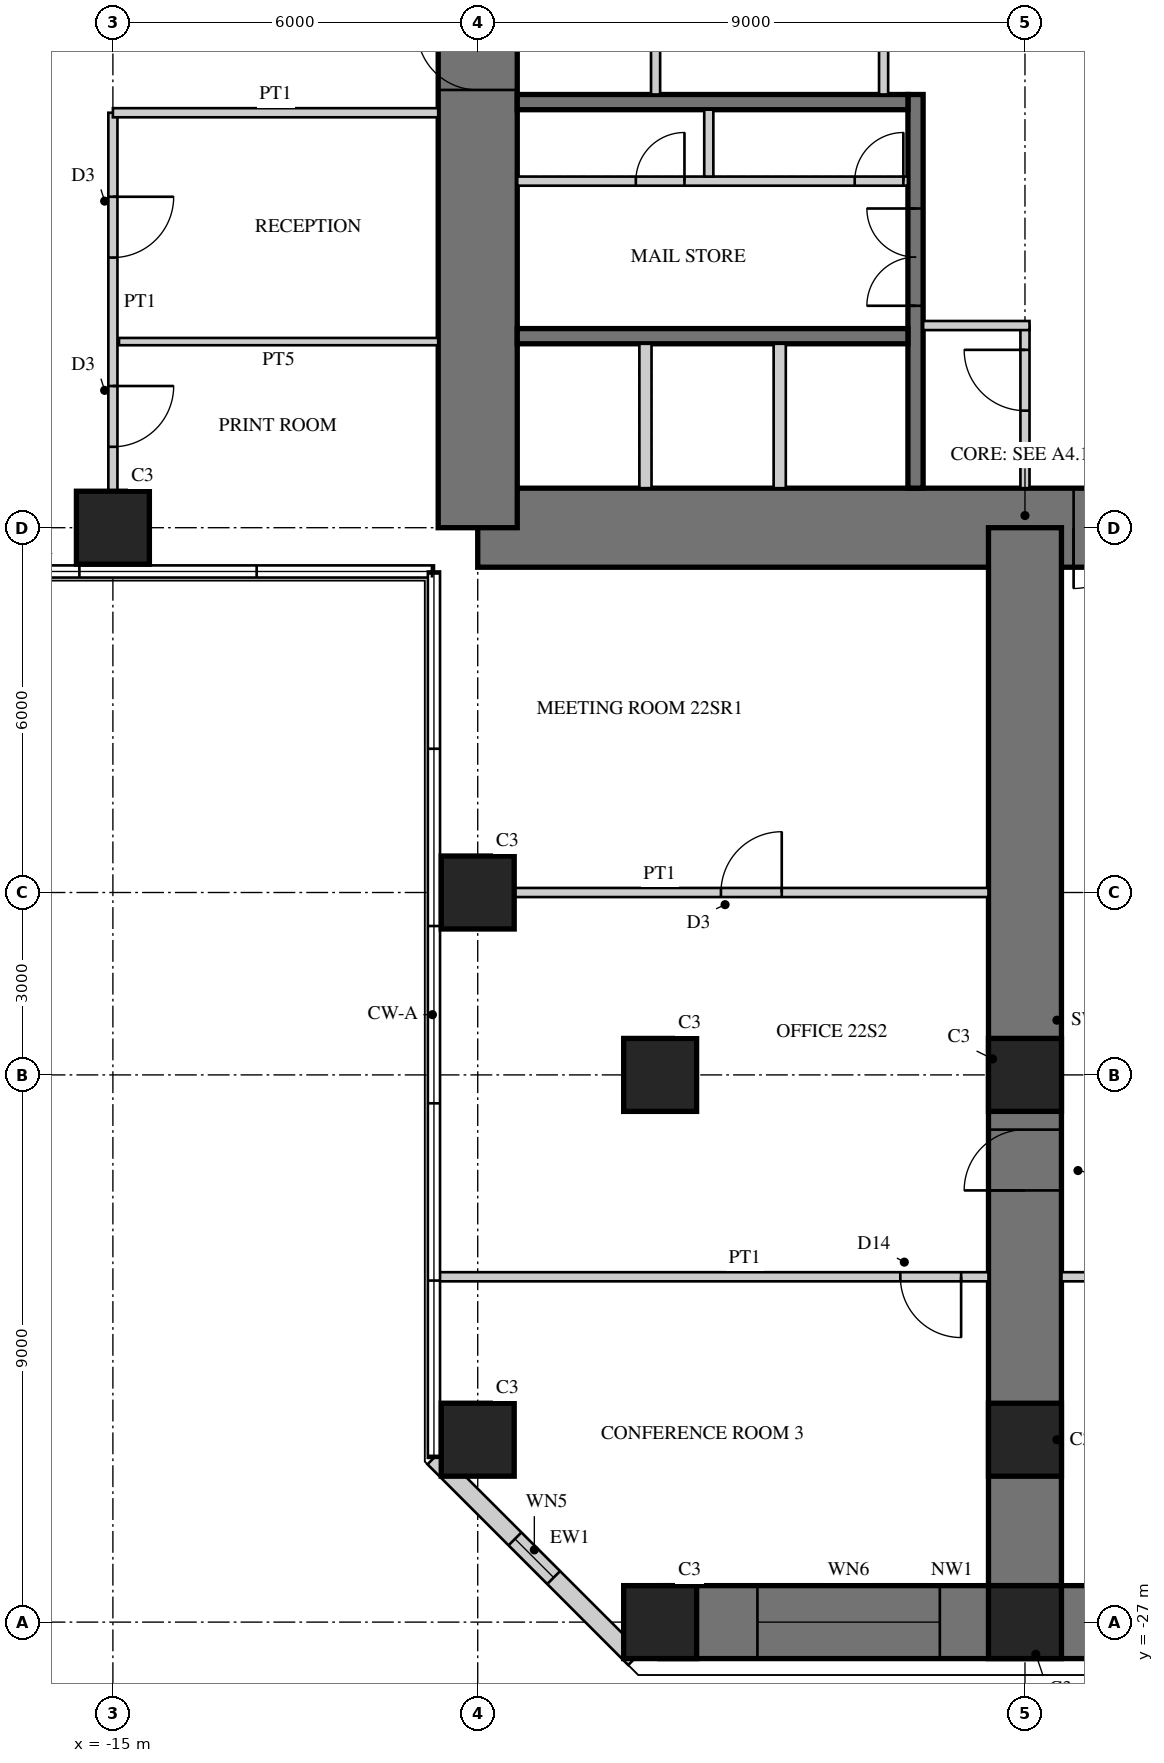
"""IFC4 building model, lengths in metres.
Left out: names, types, materials, properties, quantities, classifications, styles, units other than length and angle.
Written with IfcOpenShell. Run it as: python <this file> out.ifc"""

import sys

from ifc_helpers import new_model, si_unit, direction, frame, frame_2d, origin, origin_2d, place, context, subcontext, project, spatial, rectangle, hollow_rectangle, extrude, element, fill, save


model = new_model("IFC4")
c1 = context("Model", 3, precision=1e-05, world=origin(), true_north=direction((0.0, 1.0)))
c2 = subcontext(c1, "Body", "Model", "MODEL_VIEW")
j1 = project(units=[si_unit("LENGTHUNIT", "METRE"), si_unit("PLANEANGLEUNIT", "RADIAN")], contexts=[c1])
p1 = place(None, origin())
s1 = spatial("IfcSite", under=j1, at=p1, CompositionType="ELEMENT")
p2 = place(p1, origin())
s2 = spatial("IfcBuilding", under=s1, at=p2, CompositionType="ELEMENT")
p3 = place(p2, frame((0.0, 0.0, 91.5)))
s3 = spatial("IfcBuildingStorey", under=s2, at=p3, CompositionType="ELEMENT", Elevation=91.5)
p4 = place(p3, frame((-9.0, -9.0, 0.0), z_axis=(0.0, 0.0, 1.0), x_axis=(1.0, 0.0, 0.0)))
e1 = element("IfcWall", 1, at=p4, inside=s3, PredefinedType="SHEAR", context=c2, shape_type="SweptSolid", body=[
    extrude(rectangle(XDim=18.0, YDim=1.3, at=frame_2d((9.0, 0.0))), origin(), (0.0, 0.0, 1.0), 4.0),
])
p5 = place(p4, frame((9.8, 0.0, 0.0)))
e2 = element("IfcOpeningElement", 2, at=p5, cuts=e1, PredefinedType="OPENING", context=c2, shape_type="SweptSolid", body=[
    extrude(rectangle(XDim=1.0, YDim=2.4, at=frame_2d((0.5, 1.2))), frame((0.0, 0.66, 0.0), z_axis=(0.0, -1.0, 0.0), x_axis=(1.0, 0.0, 0.0)), (0.0, 0.0, 1.0), 1.32),
])
p6 = place(p3, frame((-9.0, 9.0, 0.0), z_axis=(0.0, 0.0, 1.0), x_axis=(0.0, -1.0, 0.0)))
e3 = element("IfcWall", 3, at=p6, inside=s3, PredefinedType="SHEAR", context=c2, shape_type="SweptSolid", body=[
    extrude(rectangle(XDim=18.0, YDim=1.3, at=frame_2d((9.0, 0.0))), origin(), (0.0, 0.0, 1.0), 4.0),
])
p7 = place(p6, frame((9.8, 0.0, 0.0)))
e4 = element("IfcOpeningElement", 4, at=p7, cuts=e3, PredefinedType="OPENING", context=c2, shape_type="SweptSolid", body=[
    extrude(rectangle(XDim=1.0, YDim=2.4, at=frame_2d((0.5, 1.2))), frame((0.0, 0.66, 0.0), z_axis=(0.0, -1.0, 0.0), x_axis=(1.0, 0.0, 0.0)), (0.0, 0.0, 1.0), 1.32),
])
p8 = place(p3, frame((-1.8, -1.875, 0.0), z_axis=(0.0, 0.0, 1.0), x_axis=(0.0, -1.0, 0.0)))
e5 = element("IfcWall", 5, at=p8, inside=s3, PredefinedType="SHEAR", context=c2, shape_type="SweptSolid", body=[
    extrude(rectangle(XDim=6.475, YDim=0.25, at=frame_2d((3.238, 0.0))), origin(), (0.0, 0.0, 1.0), 4.0),
])
p9 = place(p8, frame((1.875, 0.0, 0.0)))
e6 = element("IfcOpeningElement", 6, at=p9, cuts=e5, PredefinedType="OPENING", context=c2, shape_type="SweptSolid", body=[
    extrude(rectangle(XDim=1.6, YDim=2.4, at=frame_2d((0.8, 1.2))), frame((0.0, 0.135, 0.0), z_axis=(0.0, -1.0, 0.0), x_axis=(1.0, 0.0, 0.0)), (0.0, 0.0, 1.0), 0.27),
])
for number, where, z_axis, x_axis in (
    (7, (-1.925, -2.0, 0.0), (0.0, 0.0, 1.0), (-1.0, 0.0, 0.0)),
    (8, (-1.925, -5.85, 0.0), (0.0, 0.0, 1.0), (-1.0, 0.0, 0.0)),
):
    element("IfcWall", number, at=place(p3, frame(where, z_axis=z_axis, x_axis=x_axis)), inside=s3, PredefinedType="SHEAR", context=c2, shape_type="SweptSolid", body=[
        extrude(rectangle(XDim=6.425, YDim=0.25, at=frame_2d((3.212, 0.0))), origin(), (0.0, 0.0, 1.0), 4.0),
    ])
p10 = place(p3, frame((-1.925, -3.3, 0.0), z_axis=(0.0, 0.0, 1.0), x_axis=(-1.0, 0.0, 0.0)))
e9 = element("IfcWall", 9, at=p10, inside=s3, PredefinedType="PARTITIONING", context=c2, shape_type="SweptSolid", body=[
    extrude(rectangle(XDim=6.425, YDim=0.15, at=frame_2d((3.212, 0.0))), origin(), (0.0, 0.0, 1.0), 4.0),
])
p11 = place(p10, frame((0.075, 0.0, 0.0)))
e10 = element("IfcOpeningElement", 10, at=p11, cuts=e9, PredefinedType="OPENING", context=c2, shape_type="SweptSolid", body=[
    extrude(rectangle(XDim=0.8, YDim=2.1, at=frame_2d((0.4, 1.05))), frame((0.0, 0.085, 0.0), z_axis=(0.0, -1.0, 0.0), x_axis=(1.0, 0.0, 0.0)), (0.0, 0.0, 1.0), 0.17),
])
p12 = place(p10, frame((3.675, 0.0, 0.0)))
e11 = element("IfcOpeningElement", 11, at=p12, cuts=e9, PredefinedType="OPENING", context=c2, shape_type="SweptSolid", body=[
    extrude(rectangle(XDim=0.8, YDim=2.1, at=frame_2d((0.4, 1.05))), frame((0.0, 0.085, 0.0), z_axis=(0.0, -1.0, 0.0), x_axis=(1.0, 0.0, 0.0)), (0.0, 0.0, 1.0), 0.17),
])
p13 = place(p3, frame((-5.2, -2.125, 0.0), z_axis=(0.0, 0.0, 1.0), x_axis=(0.0, -1.0, 0.0)))
e12 = element("IfcWall", 12, at=p13, inside=s3, PredefinedType="PARTITIONING", context=c2, shape_type="SweptSolid", body=[
    extrude(rectangle(XDim=1.1, YDim=0.15, at=frame_2d((0.55, 0.0))), origin(), (0.0, 0.0, 1.0), 4.0),
])
for number, where, z_axis, x_axis in (
    (13, (-4.033, -5.975, 0.0), (0.0, 0.0, 1.0), (0.0, -1.0, 0.0)),
    (14, (-6.242, -5.975, 0.0), (0.0, 0.0, 1.0), (0.0, -1.0, 0.0)),
):
    element("IfcWall", number, at=place(p3, frame(where, z_axis=z_axis, x_axis=x_axis)), inside=s3, PredefinedType="PARTITIONING", context=c2, shape_type="SweptSolid", body=[
        extrude(rectangle(XDim=2.375, YDim=0.2, at=frame_2d((1.188, 0.0))), origin(), (0.0, 0.0, 1.0), 4.0),
    ])
p14 = place(p3, frame((0.0, -9.0, 0.0), z_axis=(0.0, 0.0, 1.0), x_axis=(0.0, -1.0, 0.0)))
e15 = element("IfcWall", 15, at=p14, inside=s3, PredefinedType="SHEAR", context=c2, shape_type="SweptSolid", body=[
    extrude(rectangle(XDim=18.0, YDim=1.2, at=frame_2d((9.0, 0.0))), origin(), (0.0, 0.0, 1.0), 4.0),
])
p15 = place(p14, frame((9.9, 0.0, 0.0)))
e16 = element("IfcOpeningElement", 16, at=p15, cuts=e15, PredefinedType="OPENING", context=c2, shape_type="SweptSolid", body=[
    extrude(rectangle(XDim=1.0, YDim=2.2, at=frame_2d((0.5, 1.1))), frame((0.0, 0.61, 0.0), z_axis=(0.0, -1.0, 0.0), x_axis=(1.0, 0.0, 0.0)), (0.0, 0.0, 1.0), 1.22),
])
p16 = place(p3, frame((-6.0, -27.0, 0.0), z_axis=(0.0, 0.0, 1.0), x_axis=(1.0, 0.0, 0.0)))
e17 = element("IfcWall", 17, at=p16, inside=s3, PredefinedType="SHEAR", context=c2, shape_type="SweptSolid", body=[
    extrude(rectangle(XDim=12.0, YDim=1.2, at=frame_2d((6.0, 0.0))), origin(), (0.0, 0.0, 1.0), 4.0),
])
p17 = place(p16, frame((1.6, 0.0, 0.6)))
e18 = element("IfcOpeningElement", 18, at=p17, cuts=e17, PredefinedType="OPENING", context=c2, shape_type="SweptSolid", body=[
    extrude(rectangle(XDim=3.0, YDim=2.4, at=frame_2d((1.5, 1.2))), frame((0.0, 0.61, 0.0), z_axis=(0.0, -1.0, 0.0), x_axis=(1.0, 0.0, 0.0)), (0.0, 0.0, 1.0), 1.22),
])
p18 = place(p16, frame((7.4, 0.0, 0.6)))
e19 = element("IfcOpeningElement", 19, at=p18, cuts=e17, PredefinedType="OPENING", context=c2, shape_type="SweptSolid", body=[
    extrude(rectangle(XDim=3.0, YDim=2.4, at=frame_2d((1.5, 1.2))), frame((0.0, 0.61, 0.0), z_axis=(0.0, -1.0, 0.0), x_axis=(1.0, 0.0, 0.0)), (0.0, 0.0, 1.0), 1.22),
])
for number, where, z_axis, x_axis in (
    (20, (-9.0, -15.0, 0.0), (0.0, 0.0, 1.0), (1.0, 0.0, 0.0)),
    (21, (-9.0, -24.0, 0.0), (0.0, 0.0, 1.0), (1.0, 0.0, 0.0)),
    (22, (-6.0, -27.0, 0.0), (0.0, 0.0, 1.0), (1.0, 0.0, 0.0)),
    (23, (0.0, -27.0, 0.0), (0.0, 0.0, 1.0), (1.0, 0.0, 0.0)),
    (24, (-15.0, -9.0, 0.0), (0.0, 0.0, 1.0), (1.0, 0.0, 0.0)),
    (25, (-6.0, -18.0, 0.0), (0.0, 0.0, 1.0), (1.0, 0.0, 0.0)),
    (26, (0.0, -18.0, 0.0), (0.0, 0.0, 1.0), (1.0, 0.0, 0.0)),
    (27, (0.0, -24.0, 0.0), (0.0, 0.0, 1.0), (1.0, 0.0, 0.0)),
):
    element("IfcColumn", number, at=place(p3, frame(where, z_axis=z_axis, x_axis=x_axis)), inside=s3, PredefinedType="COLUMN", context=c2, shape_type="SweptSolid", body=[
        extrude(rectangle(XDim=1.2, YDim=1.2, at=origin_2d()), origin(), (0.0, 0.0, 1.0), 4.0),
    ])
p19 = place(p3, frame((-9.72, -24.298, 0.0), z_axis=(0.0, 0.0, 1.0), x_axis=(0.707106781187, -0.707106781187, 0.0)))
e28 = element("IfcWall", 28, at=p19, inside=s3, PredefinedType="SOLIDWALL", context=c2, shape_type="SweptSolid", body=[
    extrude(rectangle(XDim=4.669, YDim=0.3, at=frame_2d((2.335, 0.0))), origin(), (0.0, 0.0, 1.0), 3.75),
])
p20 = place(p19, frame((1.885, 0.0, 0.3)))
e29 = element("IfcOpeningElement", 29, at=p20, cuts=e28, PredefinedType="OPENING", context=c2, shape_type="SweptSolid", body=[
    extrude(rectangle(XDim=0.9, YDim=2.4, at=frame_2d((0.45, 1.2))), frame((0.0, 0.16, 0.0), z_axis=(0.0, -1.0, 0.0), x_axis=(1.0, 0.0, 0.0)), (0.0, 0.0, 1.0), 0.32),
])
for number, where, z_axis, x_axis in (
    (30, (-2.325, -1.875, 0.0), (0.0, 0.0, 1.0), (0.0, 1.0, 0.0)),
    (31, (-6.075, 0.075, 0.0), (0.0, 0.0, 1.0), (0.0, -1.0, 0.0)),
):
    element("IfcWall", number, at=place(p3, frame(where, z_axis=z_axis, x_axis=x_axis)), inside=s3, PredefinedType="PARTITIONING", context=c2, shape_type="SweptSolid", body=[
        extrude(rectangle(XDim=1.95, YDim=0.15, at=frame_2d((0.975, 0.0))), origin(), (0.0, 0.0, 1.0), 3.75),
    ])
p21 = place(p3, frame((0.0, -5.675, 0.0), z_axis=(0.0, 0.0, 1.0), x_axis=(0.0, -1.0, 0.0)))
e32 = element("IfcWall", 32, at=p21, inside=s3, PredefinedType="PARTITIONING", context=c2, shape_type="SweptSolid", body=[
    extrude(rectangle(XDim=2.675, YDim=0.15, at=frame_2d((1.337, 0.0))), origin(), (0.0, 0.0, 1.0), 3.75),
])
p22 = place(p21, frame((0.4, 0.0, 0.0)))
e33 = element("IfcOpeningElement", 33, at=p22, cuts=e32, PredefinedType="OPENING", context=c2, shape_type="SweptSolid", body=[
    extrude(rectangle(XDim=1.0, YDim=2.1, at=frame_2d((0.5, 1.05))), frame((0.0, 0.085, 0.0), z_axis=(0.0, -1.0, 0.0), x_axis=(1.0, 0.0, 0.0)), (0.0, 0.0, 1.0), 0.17),
])
p23 = place(p3, frame((-1.675, -5.675, 0.0), z_axis=(0.0, 0.0, 1.0), x_axis=(1.0, 0.0, 0.0)))
e34 = element("IfcWall", 34, at=p23, inside=s3, PredefinedType="PARTITIONING", context=c2, shape_type="SweptSolid", body=[
    extrude(rectangle(XDim=1.75, YDim=0.15, at=frame_2d((0.875, 0.0))), origin(), (0.0, 0.0, 1.0), 3.75),
])
p24 = place(p3, frame((-8.4, -15.0, 0.0), z_axis=(0.0, 0.0, 1.0), x_axis=(1.0, 0.0, 0.0)))
e35 = element("IfcWall", 35, at=p24, inside=s3, PredefinedType="PARTITIONING", context=c2, shape_type="SweptSolid", body=[
    extrude(rectangle(XDim=7.8, YDim=0.15, at=frame_2d((3.9, 0.0))), origin(), (0.0, 0.0, 1.0), 2.7),
])
p25 = place(p24, frame((3.4, 0.0, 0.0)))
e36 = element("IfcOpeningElement", 36, at=p25, cuts=e35, PredefinedType="OPENING", context=c2, shape_type="SweptSolid", body=[
    extrude(rectangle(XDim=1.0, YDim=2.1, at=frame_2d((0.5, 1.05))), frame((0.0, 0.085, 0.0), z_axis=(0.0, -1.0, 0.0), x_axis=(1.0, 0.0, 0.0)), (0.0, 0.0, 1.0), 0.17),
])
p26 = place(p3, frame((0.6, -21.32, 0.0), z_axis=(0.0, 0.0, 1.0), x_axis=(1.0, 0.0, 0.0)))
e37 = element("IfcWall", 37, at=p26, inside=s3, PredefinedType="PARTITIONING", context=c2, shape_type="SweptSolid", body=[
    extrude(rectangle(XDim=9.08, YDim=0.15, at=frame_2d((4.54, 0.0))), origin(), (0.0, 0.0, 1.0), 3.75),
])
p27 = place(p26, frame((0.45, 0.0, 0.0)))
e38 = element("IfcOpeningElement", 38, at=p27, cuts=e37, PredefinedType="OPENING", context=c2, shape_type="SweptSolid", body=[
    extrude(rectangle(XDim=1.0, YDim=2.2, at=frame_2d((0.5, 1.1))), frame((0.0, 0.085, 0.0), z_axis=(0.0, -1.0, 0.0), x_axis=(1.0, 0.0, 0.0)), (0.0, 0.0, 1.0), 0.17),
])
p28 = place(p3, frame((-9.68, -21.32, 0.0), z_axis=(0.0, 0.0, 1.0), x_axis=(1.0, 0.0, 0.0)))
e39 = element("IfcWall", 39, at=p28, inside=s3, PredefinedType="PARTITIONING", context=c2, shape_type="SweptSolid", body=[
    extrude(rectangle(XDim=9.08, YDim=0.15, at=frame_2d((4.54, 0.0))), origin(), (0.0, 0.0, 1.0), 3.75),
])
p29 = place(p28, frame((7.63, 0.0, 0.0)))
e40 = element("IfcOpeningElement", 40, at=p29, cuts=e39, PredefinedType="OPENING", context=c2, shape_type="SweptSolid", body=[
    extrude(rectangle(XDim=1.0, YDim=2.2, at=frame_2d((0.5, 1.1))), frame((0.0, 0.085, 0.0), z_axis=(0.0, -1.0, 0.0), x_axis=(1.0, 0.0, 0.0)), (0.0, 0.0, 1.0), 0.17),
])
p30 = place(p3, frame((-15.0, -2.175, 0.0), z_axis=(0.0, 0.0, 1.0), x_axis=(0.0, -1.0, 0.0)))
e41 = element("IfcWall", 41, at=p30, inside=s3, PredefinedType="PARTITIONING", context=c2, shape_type="SweptSolid", body=[
    extrude(rectangle(XDim=6.225, YDim=0.15, at=frame_2d((3.112, 0.0))), origin(), (0.0, 0.0, 1.0), 2.7),
])
p31 = place(p30, frame((1.382, 0.0, 0.0)))
e42 = element("IfcOpeningElement", 42, at=p31, cuts=e41, PredefinedType="OPENING", context=c2, shape_type="SweptSolid", body=[
    extrude(rectangle(XDim=1.0, YDim=2.1, at=frame_2d((0.5, 1.05))), frame((0.0, 0.085, 0.0), z_axis=(0.0, -1.0, 0.0), x_axis=(1.0, 0.0, 0.0)), (0.0, 0.0, 1.0), 0.17),
])
p32 = place(p30, frame((4.494, 0.0, 0.0)))
e43 = element("IfcOpeningElement", 43, at=p32, cuts=e41, PredefinedType="OPENING", context=c2, shape_type="SweptSolid", body=[
    extrude(rectangle(XDim=1.0, YDim=2.1, at=frame_2d((0.5, 1.05))), frame((0.0, 0.085, 0.0), z_axis=(0.0, -1.0, 0.0), x_axis=(1.0, 0.0, 0.0)), (0.0, 0.0, 1.0), 0.17),
])
p33 = place(p3, frame((-9.65, -2.175, 0.0), z_axis=(0.0, 0.0, 1.0), x_axis=(-1.0, 0.0, 0.0)))
e44 = element("IfcWall", 44, at=p33, inside=s3, PredefinedType="PARTITIONING", context=c2, shape_type="SweptSolid", body=[
    extrude(rectangle(XDim=5.35, YDim=0.15, at=frame_2d((2.675, 0.0))), origin(), (0.0, 0.0, 1.0), 3.75),
])
p34 = place(p3, frame((-9.65, -5.939, 0.0), z_axis=(0.0, 0.0, 1.0), x_axis=(-1.0, 0.0, 0.0)))
e45 = element("IfcWall", 45, at=p34, inside=s3, PredefinedType="PLUMBINGWALL", context=c2, shape_type="SweptSolid", body=[
    extrude(rectangle(XDim=5.25, YDim=0.12, at=frame_2d((2.625, 0.0))), origin(), (0.0, 0.0, 1.0), 2.8),
])
p35 = place(p20, origin())
e46 = element("IfcWindow", 46, at=p35, inside=s3, PartitioningType="SINGLE_PANEL", PredefinedType="WINDOW", context=c2, shape_type="SweptSolid", body=[
    extrude(hollow_rectangle(XDim=0.9, YDim=2.4, WallThickness=0.06, at=frame_2d((0.45, 1.2))), frame((0.0, 0.03, 0.0), z_axis=(0.0, -1.0, 0.0), x_axis=(1.0, 0.0, 0.0)), (0.0, 0.0, 1.0), 0.06),
    extrude(rectangle(XDim=0.779, YDim=2.279, at=frame_2d((0.45, 1.2))), frame((0.0, 0.03, 0.0), z_axis=(0.0, -1.0, 0.0), x_axis=(1.0, 0.0, 0.0)), (0.0, 0.0, 1.0), 0.06),
])
fill(e29, e46)
p36 = place(p17, origin())
e47 = element("IfcWindow", 47, at=p36, inside=s3, PartitioningType="SINGLE_PANEL", PredefinedType="WINDOW", context=c2, shape_type="SweptSolid", body=[
    extrude(hollow_rectangle(XDim=3.0, YDim=2.4, WallThickness=0.06, at=frame_2d((1.5, 1.2))), frame((0.0, 0.03, 0.0), z_axis=(0.0, -1.0, 0.0), x_axis=(1.0, 0.0, 0.0)), (0.0, 0.0, 1.0), 0.06),
    extrude(rectangle(XDim=2.879, YDim=2.279, at=frame_2d((1.5, 1.2))), frame((0.0, 0.03, 0.0), z_axis=(0.0, -1.0, 0.0), x_axis=(1.0, 0.0, 0.0)), (0.0, 0.0, 1.0), 0.06),
])
fill(e18, e47)
p37 = place(p22, frame((1.0, 0.0, 0.0), z_axis=(0.0, 0.0, 1.0), x_axis=(-1.0, 0.0, 0.0)))
e48 = element("IfcDoor", 48, at=p37, inside=s3, OperationType="SINGLE_SWING_RIGHT", PredefinedType="DOOR", context=c2, shape_type="SweptSolid", body=[
    extrude(rectangle(XDim=1.0, YDim=2.1, at=frame_2d((0.5, 1.05))), frame((0.0, 0.025, 0.0), z_axis=(0.0, -1.0, 0.0), x_axis=(1.0, 0.0, 0.0)), (0.0, 0.0, 1.0), 0.05),
])
fill(e33, e48)
p38 = place(p25, origin())
e49 = element("IfcDoor", 49, at=p38, inside=s3, OperationType="SINGLE_SWING_RIGHT", PredefinedType="DOOR", context=c2, shape_type="SweptSolid", body=[
    extrude(rectangle(XDim=1.0, YDim=2.1, at=frame_2d((0.5, 1.05))), frame((0.0, 0.025, 0.0), z_axis=(0.0, -1.0, 0.0), x_axis=(1.0, 0.0, 0.0)), (0.0, 0.0, 1.0), 0.05),
])
fill(e36, e49)
p39 = place(p29, frame((1.0, 0.0, 0.0), z_axis=(0.0, 0.0, 1.0), x_axis=(-1.0, 0.0, 0.0)))
e50 = element("IfcDoor", 50, at=p39, inside=s3, OperationType="SINGLE_SWING_LEFT", PredefinedType="DOOR", context=c2, shape_type="SweptSolid", body=[
    extrude(rectangle(XDim=1.0, YDim=2.2, at=frame_2d((0.5, 1.1))), frame((0.0, 0.025, 0.0), z_axis=(0.0, -1.0, 0.0), x_axis=(1.0, 0.0, 0.0)), (0.0, 0.0, 1.0), 0.05),
])
fill(e40, e50)
p40 = place(p31, origin())
e51 = element("IfcDoor", 51, at=p40, inside=s3, OperationType="SINGLE_SWING_LEFT", PredefinedType="DOOR", context=c2, shape_type="SweptSolid", body=[
    extrude(rectangle(XDim=1.0, YDim=2.1, at=frame_2d((0.5, 1.05))), frame((0.0, 0.025, 0.0), z_axis=(0.0, -1.0, 0.0), x_axis=(1.0, 0.0, 0.0)), (0.0, 0.0, 1.0), 0.05),
])
fill(e42, e51)
p41 = place(p32, origin())
e52 = element("IfcDoor", 52, at=p41, inside=s3, OperationType="SINGLE_SWING_LEFT", PredefinedType="DOOR", context=c2, shape_type="SweptSolid", body=[
    extrude(rectangle(XDim=1.0, YDim=2.1, at=frame_2d((0.5, 1.05))), frame((0.0, 0.025, 0.0), z_axis=(0.0, -1.0, 0.0), x_axis=(1.0, 0.0, 0.0)), (0.0, 0.0, 1.0), 0.05),
])
fill(e43, e52)
p42 = place(p15, frame((1.0, 0.0, 0.0), z_axis=(0.0, 0.0, 1.0), x_axis=(-1.0, 0.0, 0.0)))
e53 = element("IfcDoor", 53, at=p42, inside=s3, OperationType="SINGLE_SWING_LEFT", PredefinedType="DOOR", context=c2, shape_type="SweptSolid", body=[
    extrude(rectangle(XDim=1.0, YDim=2.2, at=frame_2d((0.5, 1.1))), frame((0.0, 0.025, 0.0), z_axis=(0.0, -1.0, 0.0), x_axis=(1.0, 0.0, 0.0)), (0.0, 0.0, 1.0), 0.05),
])
fill(e16, e53)
p43 = place(p5, frame((1.0, 0.0, 0.0), z_axis=(0.0, 0.0, 1.0), x_axis=(-1.0, 0.0, 0.0)))
e54 = element("IfcDoor", 54, at=p43, inside=s3, OperationType="SINGLE_SWING_RIGHT", PredefinedType="DOOR", context=c2, shape_type="SweptSolid", body=[
    extrude(rectangle(XDim=1.0, YDim=2.4, at=frame_2d((0.5, 1.2))), frame((0.0, -0.005, 0.0), z_axis=(0.0, -1.0, 0.0), x_axis=(1.0, 0.0, 0.0)), (0.0, 0.0, 1.0), 0.05),
])
fill(e2, e54)
p44 = place(p7, frame((1.0, 0.0, 0.0), z_axis=(0.0, 0.0, 1.0), x_axis=(-1.0, 0.0, 0.0)))
e55 = element("IfcDoor", 55, at=p44, inside=s3, OperationType="SINGLE_SWING_RIGHT", PredefinedType="DOOR", context=c2, shape_type="SweptSolid", body=[
    extrude(rectangle(XDim=1.0, YDim=2.4, at=frame_2d((0.5, 1.2))), frame((0.0, -0.005, 0.0), z_axis=(0.0, -1.0, 0.0), x_axis=(1.0, 0.0, 0.0)), (0.0, 0.0, 1.0), 0.05),
])
fill(e4, e55)
p45 = place(p9, frame((1.6, 0.0, 0.0), z_axis=(0.0, 0.0, 1.0), x_axis=(-1.0, 0.0, 0.0)))
e56 = element("IfcDoor", 56, at=p45, inside=s3, OperationType="DOUBLE_DOOR_SINGLE_SWING", PredefinedType="DOOR", context=c2, shape_type="SweptSolid", body=[
    extrude(rectangle(XDim=1.6, YDim=2.4, at=frame_2d((0.8, 1.2))), frame((0.0, 0.025, 0.0), z_axis=(0.0, -1.0, 0.0), x_axis=(1.0, 0.0, 0.0)), (0.0, 0.0, 1.0), 0.05),
])
fill(e6, e56)
p46 = place(p11, frame((0.8, 0.0, 0.0), z_axis=(0.0, 0.0, 1.0), x_axis=(-1.0, 0.0, 0.0)))
e57 = element("IfcDoor", 57, at=p46, inside=s3, OperationType="SINGLE_SWING_RIGHT", PredefinedType="DOOR", context=c2, shape_type="SweptSolid", body=[
    extrude(rectangle(XDim=0.8, YDim=2.1, at=frame_2d((0.4, 1.05))), frame((0.0, 0.025, 0.0), z_axis=(0.0, -1.0, 0.0), x_axis=(1.0, 0.0, 0.0)), (0.0, 0.0, 1.0), 0.05),
])
fill(e10, e57)
p47 = place(p12, frame((0.8, 0.0, 0.0), z_axis=(0.0, 0.0, 1.0), x_axis=(-1.0, 0.0, 0.0)))
e58 = element("IfcDoor", 58, at=p47, inside=s3, OperationType="SINGLE_SWING_RIGHT", PredefinedType="DOOR", context=c2, shape_type="SweptSolid", body=[
    extrude(rectangle(XDim=0.8, YDim=2.1, at=frame_2d((0.4, 1.05))), frame((0.0, 0.025, 0.0), z_axis=(0.0, -1.0, 0.0), x_axis=(1.0, 0.0, 0.0)), (0.0, 0.0, 1.0), 0.05),
])
fill(e11, e58)
save(model, sys.argv[1])
